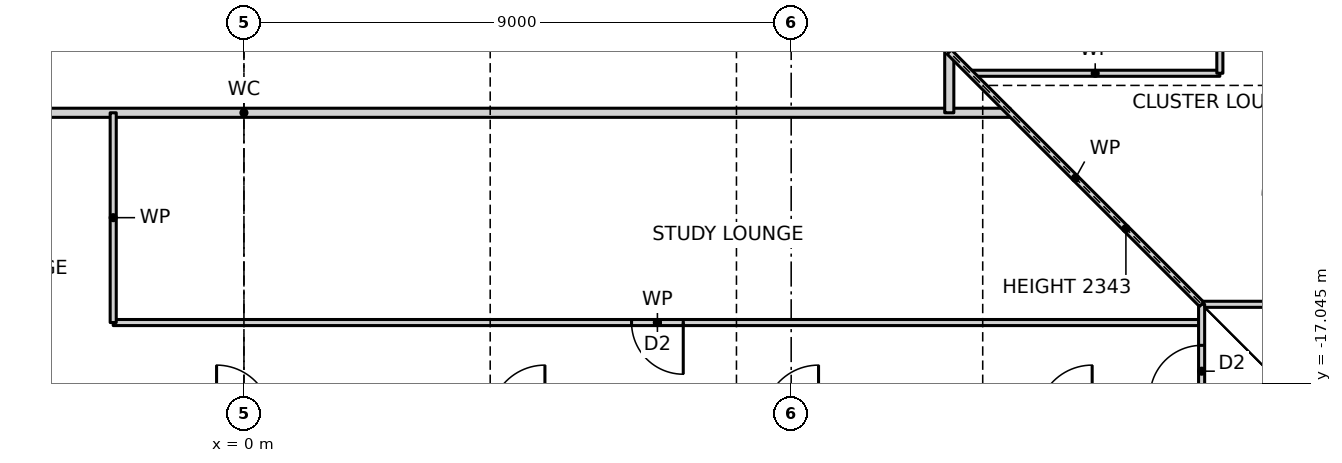
"""IFC4 building model, lengths in metres.
Left out: names, types, materials, properties, quantities, classifications, styles, units other than length and angle.
Written with IfcOpenShell. Run it as: python <this file> out.ifc"""

import sys

from ifc_helpers import new_model, si_unit, direction, frame, frame_2d, origin, place, context, subcontext, project, spatial, rectangle, extrude, element, fill, save


model = new_model("IFC4")
c1 = context("Model", 3, precision=1e-05, world=origin(), true_north=direction((0.0, 1.0)))
c2 = subcontext(c1, "Body", "Model", "MODEL_VIEW")
j1 = project(units=[si_unit("LENGTHUNIT", "METRE"), si_unit("PLANEANGLEUNIT", "RADIAN")], contexts=[c1])
p1 = place(None, origin())
s1 = spatial("IfcSite", under=j1, at=p1, CompositionType="ELEMENT")
p2 = place(p1, origin())
s2 = spatial("IfcBuilding", under=s1, at=p2, CompositionType="ELEMENT")
p3 = place(p2, frame((0.0, 0.0, 18.5)))
s3 = spatial("IfcBuildingStorey", under=s2, at=p3, CompositionType="ELEMENT", Elevation=18.5)
p4 = place(p3, frame((-2.15, -16.05, 0.0), z_axis=(0.0, 0.0, 1.0), x_axis=(1.0, 0.0, 0.0)))
e1 = element("IfcWall", 1, at=p4, inside=s3, PredefinedType="PARTITIONING", context=c2, shape_type="SweptSolid", body=[
    extrude(rectangle(XDim=17.9, YDim=0.1, at=frame_2d((8.95, 0.0))), origin(), (0.0, 0.0, 1.0), 3.27),
])
p5 = place(p4, frame((8.525, 0.0, 0.0)))
e2 = element("IfcOpeningElement", 2, at=p5, cuts=e1, PredefinedType="OPENING", context=c2, shape_type="SweptSolid", body=[
    extrude(rectangle(XDim=0.85, YDim=2.1, at=frame_2d((0.425, 1.05))), frame((0.0, 0.06, 0.0), z_axis=(0.0, -1.0, 0.0), x_axis=(1.0, 0.0, 0.0)), (0.0, 0.0, 1.0), 0.12),
])
p6 = place(p3, frame((15.75, -15.75, 0.0), z_axis=(0.0, 0.0, 1.0), x_axis=(1.0, 0.0, 0.0)))
e3 = element("IfcWall", 3, at=p6, inside=s3, PredefinedType="PARTITIONING", context=c2, shape_type="SweptSolid", body=[
    extrude(rectangle(XDim=7.44, YDim=0.1, at=frame_2d((3.72, 0.0))), origin(), (0.0, 0.0, 1.0), 3.27),
])
p7 = place(p3, frame((-12.6, -12.6, 0.0), z_axis=(0.0, 0.0, 1.0), x_axis=(1.0, 0.0, 0.0)))
e4 = element("IfcWall", 4, at=p7, inside=s3, PredefinedType="PARTITIONING", context=c2, shape_type="SweptSolid", body=[
    extrude(rectangle(XDim=25.2, YDim=0.15, at=frame_2d((12.6, 0.0))), origin(), (0.0, 0.0, 1.0), 3.27),
])
p8 = place(p7, frame((8.05, 0.0, 0.0)))
e5 = element("IfcOpeningElement", 5, at=p8, cuts=e4, PredefinedType="OPENING", context=c2, shape_type="SweptSolid", body=[
    extrude(rectangle(XDim=1.0, YDim=2.1, at=frame_2d((0.5, 1.05))), frame((0.0, 0.085, 0.0), z_axis=(0.0, -1.0, 0.0), x_axis=(1.0, 0.0, 0.0)), (0.0, 0.0, 1.0), 0.17),
])
p9 = place(p7, frame((5.3, 0.0, 0.0)))
e6 = element("IfcOpeningElement", 6, at=p9, cuts=e4, PredefinedType="OPENING", context=c2, shape_type="SweptSolid", body=[
    extrude(rectangle(XDim=0.9, YDim=2.1, at=frame_2d((0.45, 1.05))), frame((0.0, 0.085, 0.0), z_axis=(0.0, -1.0, 0.0), x_axis=(1.0, 0.0, 0.0)), (0.0, 0.0, 1.0), 0.17),
])
p10 = place(p3, frame((11.95, -11.95, 0.0), z_axis=(0.0, 0.0, 1.0), x_axis=(1.0, 0.0, 0.0)))
e7 = element("IfcWall", 7, at=p10, inside=s3, PredefinedType="PARTITIONING", context=c2, shape_type="SweptSolid", body=[
    extrude(rectangle(XDim=4.1, YDim=0.1, at=frame_2d((2.05, 0.0))), origin(), (0.0, 0.0, 1.0), 3.27),
])
p11 = place(p3, frame((16.05, -11.95, 0.0), z_axis=(0.0, 0.0, 1.0), x_axis=(0.0, 1.0, 0.0)))
e8 = element("IfcWall", 8, at=p11, inside=s3, PredefinedType="PARTITIONING", context=c2, shape_type="SweptSolid", body=[
    extrude(rectangle(XDim=20.2, YDim=0.1, at=frame_2d((10.1, 0.0))), origin(), (0.0, 0.0, 1.0), 3.27),
])
p12 = place(p11, frame((9.675, 0.0, 0.0)))
e9 = element("IfcOpeningElement", 9, at=p12, cuts=e8, PredefinedType="OPENING", context=c2, shape_type="SweptSolid", body=[
    extrude(rectangle(XDim=0.85, YDim=2.1, at=frame_2d((0.425, 1.05))), frame((0.0, 0.06, 0.0), z_axis=(0.0, -1.0, 0.0), x_axis=(1.0, 0.0, 0.0)), (0.0, 0.0, 1.0), 0.12),
])
p13 = place(p3, frame((15.75, -23.19, 0.0), z_axis=(0.0, 0.0, 1.0), x_axis=(0.0, 1.0, 0.0)))
e10 = element("IfcWall", 10, at=p13, inside=s3, PredefinedType="PARTITIONING", context=c2, shape_type="SweptSolid", body=[
    extrude(rectangle(XDim=7.44, YDim=0.1, at=frame_2d((3.72, 0.0))), origin(), (0.0, 0.0, 1.0), 3.27),
])
p14 = place(p13, frame((5.915, 0.0, 0.0)))
e11 = element("IfcOpeningElement", 11, at=p14, cuts=e10, PredefinedType="OPENING", context=c2, shape_type="SweptSolid", body=[
    extrude(rectangle(XDim=0.85, YDim=2.1, at=frame_2d((0.425, 1.05))), frame((0.0, 0.06, 0.0), z_axis=(0.0, -1.0, 0.0), x_axis=(1.0, 0.0, 0.0)), (0.0, 0.0, 1.0), 0.12),
])
p15 = place(p3, frame((11.6, -12.6, 0.0), z_axis=(0.0, 0.0, 1.0), x_axis=(0.0, 1.0, 0.0)))
e12 = element("IfcWall", 12, at=p15, inside=s3, PredefinedType="PARTITIONING", context=c2, shape_type="SweptSolid", body=[
    extrude(rectangle(XDim=24.2, YDim=0.15, at=frame_2d((12.1, 0.0))), origin(), (0.0, 0.0, 1.0), 3.27),
])
p16 = place(p15, frame((21.55, 0.0, 0.0)))
e13 = element("IfcOpeningElement", 13, at=p16, cuts=e12, PredefinedType="OPENING", context=c2, shape_type="SweptSolid", body=[
    extrude(rectangle(XDim=1.0, YDim=2.1, at=frame_2d((0.5, 1.05))), frame((0.0, 0.085, 0.0), z_axis=(0.0, -1.0, 0.0), x_axis=(1.0, 0.0, 0.0)), (0.0, 0.0, 1.0), 0.17),
])
p17 = place(p3, frame((-2.15, -16.05, 0.0), z_axis=(0.0, 0.0, 1.0), x_axis=(0.0, 1.0, 0.0)))
e14 = element("IfcWall", 14, at=p17, inside=s3, PredefinedType="PARTITIONING", context=c2, shape_type="SweptSolid", body=[
    extrude(rectangle(XDim=3.45, YDim=0.1, at=frame_2d((1.725, 0.0))), origin(), (0.0, 0.0, 1.0), 3.27),
])
p18 = place(p3, frame((15.75, -15.75, 0.0), z_axis=(0.0, 0.0, 1.0), x_axis=(-0.707106781187, 0.707106781187, 0.0)))
e15 = element("IfcWall", 15, at=p18, inside=s3, PredefinedType="PARTITIONING", context=c2, shape_type="SweptSolid", body=[
    extrude(rectangle(XDim=5.869, YDim=0.1, at=frame_2d((2.935, 0.0))), origin(), (0.0, 0.0, 1.0), 2.343),
])
p19 = place(p5, frame((0.85, 0.0, 0.0), z_axis=(0.0, 0.0, 1.0), x_axis=(-1.0, 0.0, 0.0)))
e16 = element("IfcDoor", 16, at=p19, inside=s3, OperationType="SINGLE_SWING_LEFT", PredefinedType="DOOR", context=c2, shape_type="SweptSolid", body=[
    extrude(rectangle(XDim=0.85, YDim=2.1, at=frame_2d((0.425, 1.05))), frame((0.0, 0.025, 0.0), z_axis=(0.0, -1.0, 0.0), x_axis=(1.0, 0.0, 0.0)), (0.0, 0.0, 1.0), 0.05),
])
fill(e2, e16)
p20 = place(p14, origin())
e17 = element("IfcDoor", 17, at=p20, inside=s3, OperationType="SINGLE_SWING_LEFT", PredefinedType="DOOR", context=c2, shape_type="SweptSolid", body=[
    extrude(rectangle(XDim=0.85, YDim=2.1, at=frame_2d((0.425, 1.05))), frame((0.0, 0.025, 0.0), z_axis=(0.0, -1.0, 0.0), x_axis=(1.0, 0.0, 0.0)), (0.0, 0.0, 1.0), 0.05),
])
fill(e11, e17)
save(model, sys.argv[1])
